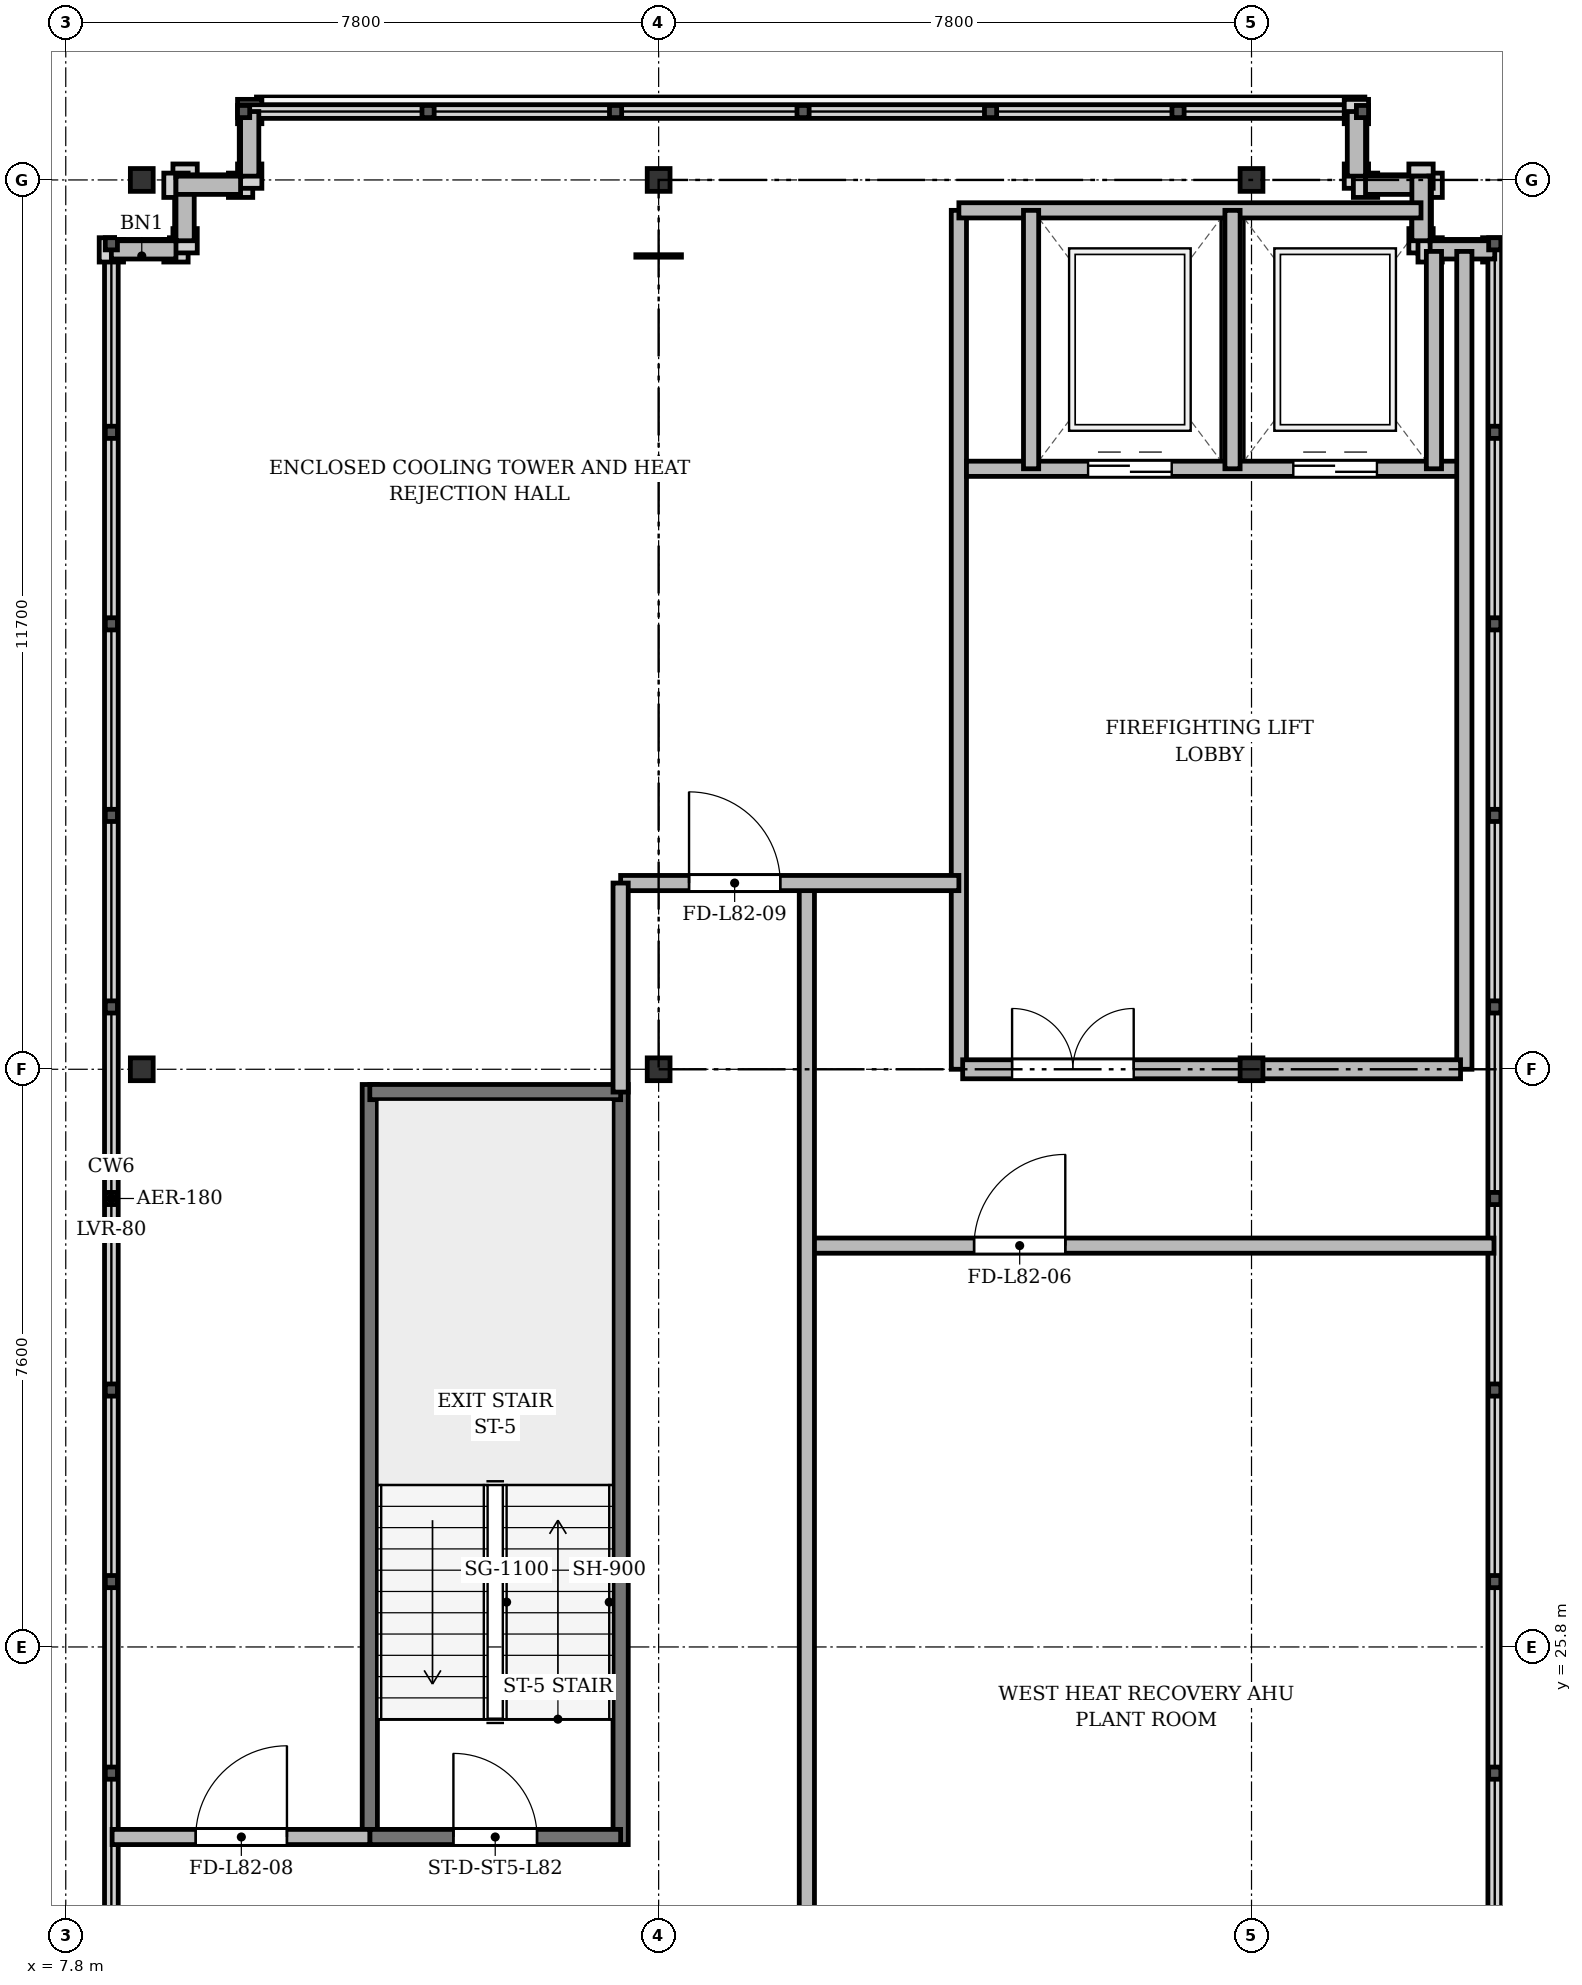
"""IFC4 building model, lengths in metres.
Left out: names, types, materials, properties, quantities, classifications, styles, units other than length and angle.
Written with IfcOpenShell. Run it as: python <this file> out.ifc"""

import sys

from ifc_helpers import new_model, si_unit, direction, frame, frame_2d, origin, origin_2d, place, context, subcontext, project, spatial, rectangle, i_section, extrude, source, transform, mapped, element, fill, save


model = new_model("IFC4")
c1 = context("Model", 3, precision=1e-05, world=origin(), true_north=direction((0.0, 1.0)))
c2 = subcontext(c1, "Body", "Model", "MODEL_VIEW")
j1 = project(units=[si_unit("LENGTHUNIT", "METRE"), si_unit("PLANEANGLEUNIT", "RADIAN")], contexts=[c1])
p1 = place(None, origin())
s1 = spatial("IfcSite", under=j1, at=p1, CompositionType="ELEMENT")
p2 = place(p1, origin())
s2 = spatial("IfcBuilding", under=s1, at=p2, CompositionType="ELEMENT")
p3 = place(p2, frame((0.0, 0.0, 316.7)))
s3 = spatial("IfcBuildingStorey", under=s2, at=p3, CompositionType="ELEMENT", Elevation=316.7)
m1 = source(origin(), c2, "Body", "SweptSolid", [
    extrude(i_section(OverallWidth=0.3, OverallDepth=0.3, WebThickness=0.015, FlangeThickness=0.024, at=origin_2d()), origin(), (0.0, 0.0, 1.0), 4.2),
])
for number, where, z_axis, x_axis in (
    (1, (8.8, 33.4, 0.0), (0.0, 0.0, 1.0), (1.0, 0.0, 0.0)),
    (2, (8.8, 45.1, 0.0), (0.0, 0.0, 1.0), (1.0, 0.0, 0.0)),
    (3, (15.6, 33.4, 0.0), (0.0, 0.0, 1.0), (1.0, 0.0, 0.0)),
    (4, (15.6, 45.1, 0.0), (0.0, 0.0, 1.0), (1.0, 0.0, 0.0)),
    (5, (23.4, 33.4, 0.0), (0.0, 0.0, 1.0), (1.0, 0.0, 0.0)),
    (6, (23.4, 45.1, 0.0), (0.0, 0.0, 1.0), (1.0, 0.0, 0.0)),
):
    element("IfcColumn", number, at=place(p3, frame(where, z_axis=z_axis, x_axis=x_axis)), inside=s3, PredefinedType="COLUMN", context=c2, shape_type="MappedRepresentation", body=[
        mapped(m1, transform((0.0, 0.0, 0.0), x_axis=(1.0, 0.0, 0.0), y_axis=(0.0, 1.0, 0.0), z_axis=(0.0, 0.0, 1.0), scale=1.0)),
    ])
p4 = place(p3, frame((8.4, 44.18, 0.0), z_axis=(0.0, 0.0, 1.0), x_axis=(1.0, 0.0, 0.0)))
e7 = element("IfcWall", 7, at=p4, inside=s3, PredefinedType="SOLIDWALL", context=c2, shape_type="SweptSolid", body=[
    extrude(rectangle(XDim=0.85, YDim=0.24, at=frame_2d((0.425, 0.0))), origin(), (0.0, 0.0, 1.0), 3.41),
])
p5 = place(p3, frame((9.37, 44.3, 0.0), z_axis=(0.0, 0.0, 1.0), x_axis=(0.0, 1.0, 0.0)))
e8 = element("IfcWall", 8, at=p5, inside=s3, PredefinedType="SOLIDWALL", context=c2, shape_type="SweptSolid", body=[
    extrude(rectangle(XDim=0.85, YDim=0.24, at=frame_2d((0.425, 0.0))), origin(), (0.0, 0.0, 1.0), 3.41),
])
for number, where, z_axis, x_axis in (
    (9, (9.25, 45.03, 0.0), (0.0, 0.0, 1.0), (1.0, 0.0, 0.0)),
    (10, (10.22, 45.15, 0.0), (0.0, 0.0, 1.0), (0.0, 1.0, 0.0)),
    (11, (24.78, 46.0, 0.0), (0.0, 0.0, 1.0), (0.0, -1.0, 0.0)),
    (12, (24.9, 45.03, 0.0), (0.0, 0.0, 1.0), (1.0, 0.0, 0.0)),
):
    element("IfcWall", number, at=place(p3, frame(where, z_axis=z_axis, x_axis=x_axis)), inside=s3, PredefinedType="SOLIDWALL", context=c2, shape_type="SweptSolid", body=[
        extrude(rectangle(XDim=0.85, YDim=0.24, at=frame_2d((0.425, 0.0))), origin(), (0.0, 0.0, 1.0), 3.41),
    ])
p6 = place(p3, frame((25.63, 45.15, 0.0), z_axis=(0.0, 0.0, 1.0), x_axis=(0.0, -1.0, 0.0)))
e13 = element("IfcWall", 13, at=p6, inside=s3, PredefinedType="SOLIDWALL", context=c2, shape_type="SweptSolid", body=[
    extrude(rectangle(XDim=0.85, YDim=0.24, at=frame_2d((0.425, 0.0))), origin(), (0.0, 0.0, 1.0), 3.41),
])
p7 = place(p3, frame((25.75, 44.18, 0.0), z_axis=(0.0, 0.0, 1.0), x_axis=(1.0, 0.0, 0.0)))
e14 = element("IfcWall", 14, at=p7, inside=s3, PredefinedType="SOLIDWALL", context=c2, shape_type="SweptSolid", body=[
    extrude(rectangle(XDim=0.85, YDim=0.24, at=frame_2d((0.425, 0.0))), origin(), (0.0, 0.0, 1.0), 3.91),
])
for number, where, z_axis, x_axis in (
    (15, (11.8, 23.2, 0.0), (0.0, 0.0, 1.0), (0.0, 1.0, 0.0)),
    (16, (15.1, 23.2, 0.0), (0.0, 0.0, 1.0), (0.0, 1.0, 0.0)),
):
    element("IfcWall", number, at=place(p3, frame(where, z_axis=z_axis, x_axis=x_axis)), inside=s3, PredefinedType="SHEAR", context=c2, shape_type="SweptSolid", body=[
        extrude(rectangle(XDim=10.0, YDim=0.2, at=frame_2d((5.0, 0.0))), origin(), (0.0, 0.0, 1.0), 3.91),
    ])
p8 = place(p3, frame((11.8, 33.1, 0.0), z_axis=(0.0, 0.0, 1.0), x_axis=(1.0, 0.0, 0.0)))
e17 = element("IfcWall", 17, at=p8, inside=s3, PredefinedType="SHEAR", context=c2, shape_type="SweptSolid", body=[
    extrude(rectangle(XDim=3.3, YDim=0.2, at=frame_2d((1.65, 0.0))), origin(), (0.0, 0.0, 1.0), 3.91),
])
p9 = place(p3, frame((11.8, 23.3, 0.0), z_axis=(0.0, 0.0, 1.0), x_axis=(1.0, 0.0, 0.0)))
e18 = element("IfcWall", 18, at=p9, inside=s3, PredefinedType="SHEAR", context=c2, shape_type="SweptSolid", body=[
    extrude(rectangle(XDim=3.3, YDim=0.2, at=frame_2d((1.65, 0.0))), origin(), (0.0, 0.0, 1.0), 3.91),
])
p10 = place(p9, frame((1.1, 0.0, 0.0)))
e19 = element("IfcOpeningElement", 19, at=p10, cuts=e18, PredefinedType="OPENING", context=c2, shape_type="SweptSolid", body=[
    extrude(rectangle(XDim=1.1, YDim=2.15, at=frame_2d((0.55, 1.075))), frame((0.0, 0.11, 0.0), z_axis=(0.0, -1.0, 0.0), x_axis=(1.0, 0.0, 0.0)), (0.0, 0.0, 1.0), 0.22),
])
p11 = place(p3, frame((19.55, 33.4, 0.0), z_axis=(0.0, 0.0, 1.0), x_axis=(0.0, 1.0, 0.0)))
e20 = element("IfcWall", 20, at=p11, inside=s3, PredefinedType="PARTITIONING", context=c2, shape_type="SweptSolid", body=[
    extrude(rectangle(XDim=11.3, YDim=0.2, at=frame_2d((5.65, 0.0))), origin(), (0.0, 0.0, 1.0), 3.41),
])
p12 = place(p3, frame((19.55, 44.7, 0.0), z_axis=(0.0, 0.0, 1.0), x_axis=(1.0, 0.0, 0.0)))
e21 = element("IfcWall", 21, at=p12, inside=s3, PredefinedType="PARTITIONING", context=c2, shape_type="SweptSolid", body=[
    extrude(rectangle(XDim=6.08, YDim=0.2, at=frame_2d((3.04, 0.0))), origin(), (0.0, 0.0, 1.0), 3.91),
])
p13 = place(p3, frame((19.65, 41.3, 0.0), z_axis=(0.0, 0.0, 1.0), x_axis=(1.0, 0.0, 0.0)))
e22 = element("IfcWall", 22, at=p13, inside=s3, PredefinedType="SOLIDWALL", context=c2, shape_type="SweptSolid", body=[
    extrude(rectangle(XDim=6.5, YDim=0.2, at=frame_2d((3.25, 0.0))), origin(), (0.0, 0.0, 1.0), 3.91),
])
p14 = place(p13, frame((1.6, 0.0, 0.0)))
e23 = element("IfcOpeningElement", 23, at=p14, cuts=e22, PredefinedType="OPENING", context=c2, shape_type="SweptSolid", body=[
    extrude(rectangle(XDim=1.1, YDim=2.15, at=frame_2d((0.55, 1.075))), frame((0.0, 0.11, 0.0), z_axis=(0.0, -1.0, 0.0), x_axis=(1.0, 0.0, 0.0)), (0.0, 0.0, 1.0), 0.22),
])
p15 = place(p13, frame((4.3, 0.0, 0.0)))
e24 = element("IfcOpeningElement", 24, at=p15, cuts=e22, PredefinedType="OPENING", context=c2, shape_type="SweptSolid", body=[
    extrude(rectangle(XDim=1.1, YDim=2.15, at=frame_2d((0.55, 1.075))), frame((0.0, 0.11, 0.0), z_axis=(0.0, -1.0, 0.0), x_axis=(1.0, 0.0, 0.0)), (0.0, 0.0, 1.0), 0.22),
])
for number, where, z_axis, x_axis in (
    (25, (20.5, 41.3, 0.0), (0.0, 0.0, 1.0), (0.0, 1.0, 0.0)),
    (26, (23.15, 41.3, 0.0), (0.0, 0.0, 1.0), (0.0, 1.0, 0.0)),
):
    element("IfcWall", number, at=place(p3, frame(where, z_axis=z_axis, x_axis=x_axis)), inside=s3, PredefinedType="SOLIDWALL", context=c2, shape_type="SweptSolid", body=[
        extrude(rectangle(XDim=3.4, YDim=0.2, at=frame_2d((1.7, 0.0))), origin(), (0.0, 0.0, 1.0), 3.91),
    ])
p16 = place(p3, frame((25.8, 41.3, 0.0), z_axis=(0.0, 0.0, 1.0), x_axis=(0.0, 1.0, 0.0)))
e27 = element("IfcWall", 27, at=p16, inside=s3, PredefinedType="SOLIDWALL", context=c2, shape_type="SweptSolid", body=[
    extrude(rectangle(XDim=2.86, YDim=0.2, at=frame_2d((1.43, 0.0))), origin(), (0.0, 0.0, 1.0), 3.91),
])
p17 = place(p3, frame((26.2, 33.4, 0.0), z_axis=(0.0, 0.0, 1.0), x_axis=(0.0, 1.0, 0.0)))
e28 = element("IfcWall", 28, at=p17, inside=s3, PredefinedType="SOLIDWALL", context=c2, shape_type="SweptSolid", body=[
    extrude(rectangle(XDim=10.76, YDim=0.2, at=frame_2d((5.38, 0.0))), origin(), (0.0, 0.0, 1.0), 3.41),
])
p18 = place(p3, frame((19.6, 33.4, 0.0), z_axis=(0.0, 0.0, 1.0), x_axis=(1.0, 0.0, 0.0)))
e29 = element("IfcWall", 29, at=p18, inside=s3, PredefinedType="PARTITIONING", context=c2, shape_type="SweptSolid", body=[
    extrude(rectangle(XDim=6.55, YDim=0.25, at=frame_2d((3.275, 0.0))), origin(), (0.0, 0.0, 1.0), 3.41),
])
p19 = place(p18, frame((0.65, 0.0, 0.0)))
e30 = element("IfcOpeningElement", 30, at=p19, cuts=e29, PredefinedType="OPENING", context=c2, shape_type="SweptSolid", body=[
    extrude(rectangle(XDim=1.6, YDim=2.2, at=frame_2d((0.8, 1.1))), frame((0.0, 0.135, 0.0), z_axis=(0.0, -1.0, 0.0), x_axis=(1.0, 0.0, 0.0)), (0.0, 0.0, 1.0), 0.27),
])
p20 = place(p3, frame((17.55, 31.08, 0.0), z_axis=(0.0, 0.0, 1.0), x_axis=(1.0, 0.0, 0.0)))
e31 = element("IfcWall", 31, at=p20, inside=s3, PredefinedType="PARTITIONING", context=c2, shape_type="SweptSolid", body=[
    extrude(rectangle(XDim=9.04, YDim=0.2, at=frame_2d((4.52, 0.0))), origin(), (0.0, 0.0, 1.0), 3.41),
])
p21 = place(p20, frame((2.2, 0.0, 0.0)))
e32 = element("IfcOpeningElement", 32, at=p21, cuts=e31, PredefinedType="OPENING", context=c2, shape_type="SweptSolid", body=[
    extrude(rectangle(XDim=1.2, YDim=2.15, at=frame_2d((0.6, 1.075))), frame((0.0, 0.11, 0.0), z_axis=(0.0, -1.0, 0.0), x_axis=(1.0, 0.0, 0.0)), (0.0, 0.0, 1.0), 0.22),
])
p22 = place(p3, frame((17.55, 17.41, 0.0), z_axis=(0.0, 0.0, 1.0), x_axis=(0.0, 1.0, 0.0)))
e33 = element("IfcWall", 33, at=p22, inside=s3, PredefinedType="PARTITIONING", context=c2, shape_type="SweptSolid", body=[
    extrude(rectangle(XDim=18.44, YDim=0.2, at=frame_2d((9.22, 0.0))), origin(), (0.0, 0.0, 1.0), 3.41),
])
p23 = place(p3, frame((8.41, 23.3, 0.0), z_axis=(0.0, 0.0, 1.0), x_axis=(1.0, 0.0, 0.0)))
e34 = element("IfcWall", 34, at=p23, inside=s3, PredefinedType="PARTITIONING", context=c2, shape_type="SweptSolid", body=[
    extrude(rectangle(XDim=3.39, YDim=0.2, at=frame_2d((1.695, 0.0))), origin(), (0.0, 0.0, 1.0), 3.41),
])
p24 = place(p23, frame((1.1, 0.0, 0.0)))
e35 = element("IfcOpeningElement", 35, at=p24, cuts=e34, PredefinedType="OPENING", context=c2, shape_type="SweptSolid", body=[
    extrude(rectangle(XDim=1.2, YDim=2.15, at=frame_2d((0.6, 1.075))), frame((0.0, 0.11, 0.0), z_axis=(0.0, -1.0, 0.0), x_axis=(1.0, 0.0, 0.0)), (0.0, 0.0, 1.0), 0.22),
])
p25 = place(p3, frame((15.1, 35.85, 0.0), z_axis=(0.0, 0.0, 1.0), x_axis=(1.0, 0.0, 0.0)))
e36 = element("IfcWall", 36, at=p25, inside=s3, PredefinedType="PARTITIONING", context=c2, shape_type="SweptSolid", body=[
    extrude(rectangle(XDim=4.45, YDim=0.2, at=frame_2d((2.225, 0.0))), origin(), (0.0, 0.0, 1.0), 3.41),
])
p26 = place(p25, frame((0.9, 0.0, 0.0)))
e37 = element("IfcOpeningElement", 37, at=p26, cuts=e36, PredefinedType="OPENING", context=c2, shape_type="SweptSolid", body=[
    extrude(rectangle(XDim=1.2, YDim=2.15, at=frame_2d((0.6, 1.075))), frame((0.0, 0.11, 0.0), z_axis=(0.0, -1.0, 0.0), x_axis=(1.0, 0.0, 0.0)), (0.0, 0.0, 1.0), 0.22),
])
p27 = place(p3, frame((15.1, 33.1, 0.0), z_axis=(0.0, 0.0, 1.0), x_axis=(0.0, 1.0, 0.0)))
e38 = element("IfcWall", 38, at=p27, inside=s3, PredefinedType="PARTITIONING", context=c2, shape_type="SweptSolid", body=[
    extrude(rectangle(XDim=2.75, YDim=0.2, at=frame_2d((1.375, 0.0))), origin(), (0.0, 0.0, 1.0), 3.41),
])
m2 = source(origin(), c2, "Body", "SweptSolid", [
    extrude(rectangle(XDim=1.1, YDim=2.15, at=frame_2d((0.55, 1.075))), frame((0.0, 0.025, 0.0), z_axis=(0.0, -1.0, 0.0), x_axis=(1.0, 0.0, 0.0)), (0.0, 0.0, 1.0), 0.05),
])
p28 = place(p10, origin())
e39 = element("IfcDoor", 39, at=p28, inside=s3, OperationType="SINGLE_SWING_LEFT", PredefinedType="DOOR", context=c2, shape_type="MappedRepresentation", body=[
    mapped(m2, transform((0.0, 0.0, 0.0), x_axis=(1.0, 0.0, 0.0), y_axis=(0.0, 1.0, 0.0), z_axis=(0.0, 0.0, 1.0), scale=1.0)),
])
fill(e19, e39)
p29 = place(p14, origin())
e40 = element("IfcDoor", 40, at=p29, inside=s3, OperationType="DOUBLE_DOOR_SLIDING", PredefinedType="DOOR", context=c2, shape_type="MappedRepresentation", body=[
    mapped(m2, transform((0.0, 0.0, 0.0), x_axis=(1.0, 0.0, 0.0), y_axis=(0.0, 1.0, 0.0), z_axis=(0.0, 0.0, 1.0), scale=1.0)),
])
fill(e23, e40)
p30 = place(p15, origin())
e41 = element("IfcDoor", 41, at=p30, inside=s3, OperationType="DOUBLE_DOOR_SLIDING", PredefinedType="DOOR", context=c2, shape_type="MappedRepresentation", body=[
    mapped(m2, transform((0.0, 0.0, 0.0), x_axis=(1.0, 0.0, 0.0), y_axis=(0.0, 1.0, 0.0), z_axis=(0.0, 0.0, 1.0), scale=1.0)),
])
fill(e24, e41)
m3 = source(origin(), c2, "Body", "SweptSolid", [
    extrude(rectangle(XDim=1.6, YDim=2.2, at=frame_2d((0.8, 1.1))), frame((0.0, 0.025, 0.0), z_axis=(0.0, -1.0, 0.0), x_axis=(1.0, 0.0, 0.0)), (0.0, 0.0, 1.0), 0.05),
])
p31 = place(p19, origin())
e42 = element("IfcDoor", 42, at=p31, inside=s3, OperationType="DOUBLE_DOOR_SINGLE_SWING", PredefinedType="DOOR", context=c2, shape_type="MappedRepresentation", body=[
    mapped(m3, transform((0.0, 0.0, 0.0), x_axis=(1.0, 0.0, 0.0), y_axis=(0.0, 1.0, 0.0), z_axis=(0.0, 0.0, 1.0), scale=1.0)),
])
fill(e30, e42)
m4 = source(origin(), c2, "Body", "SweptSolid", [
    extrude(rectangle(XDim=1.2, YDim=2.15, at=frame_2d((0.6, 1.075))), frame((0.0, 0.025, 0.0), z_axis=(0.0, -1.0, 0.0), x_axis=(1.0, 0.0, 0.0)), (0.0, 0.0, 1.0), 0.05),
])
p32 = place(p21, origin())
e43 = element("IfcDoor", 43, at=p32, inside=s3, OperationType="SINGLE_SWING_RIGHT", PredefinedType="DOOR", context=c2, shape_type="MappedRepresentation", body=[
    mapped(m4, transform((0.0, 0.0, 0.0), x_axis=(1.0, 0.0, 0.0), y_axis=(0.0, 1.0, 0.0), z_axis=(0.0, 0.0, 1.0), scale=1.0)),
])
fill(e32, e43)
p33 = place(p24, origin())
e44 = element("IfcDoor", 44, at=p33, inside=s3, OperationType="SINGLE_SWING_RIGHT", PredefinedType="DOOR", context=c2, shape_type="MappedRepresentation", body=[
    mapped(m4, transform((0.0, 0.0, 0.0), x_axis=(1.0, 0.0, 0.0), y_axis=(0.0, 1.0, 0.0), z_axis=(0.0, 0.0, 1.0), scale=1.0)),
])
fill(e35, e44)
p34 = place(p26, origin())
e45 = element("IfcDoor", 45, at=p34, inside=s3, OperationType="SINGLE_SWING_LEFT", PredefinedType="DOOR", context=c2, shape_type="MappedRepresentation", body=[
    mapped(m4, transform((0.0, 0.0, 0.0), x_axis=(1.0, 0.0, 0.0), y_axis=(0.0, 1.0, 0.0), z_axis=(0.0, 0.0, 1.0), scale=1.0)),
])
fill(e37, e45)
save(model, sys.argv[1])
